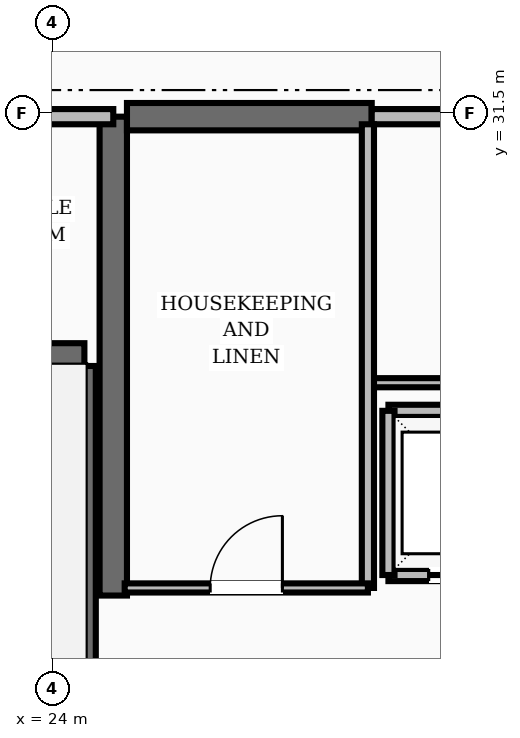
"""IFC4 building model, lengths in metres.
Left out: names, types, materials, properties, quantities, classifications, styles, units other than length and angle.
Written with IfcOpenShell. Run it as: python <this file> out.ifc"""

import sys

from ifc_helpers import new_model, si_unit, direction, frame, frame_2d, origin, place, context, subcontext, project, spatial, rectangle, extrude, element, fill, save


model = new_model("IFC4")
c1 = context("Model", 3, precision=1e-05, world=origin(), true_north=direction((0.0, 1.0)))
c2 = subcontext(c1, "Body", "Model", "MODEL_VIEW")
j1 = project(units=[si_unit("LENGTHUNIT", "METRE"), si_unit("PLANEANGLEUNIT", "RADIAN")], contexts=[c1])
p1 = place(None, origin())
s1 = spatial("IfcSite", under=j1, at=p1, CompositionType="ELEMENT")
p2 = place(p1, origin())
s2 = spatial("IfcBuilding", under=s1, at=p2, CompositionType="ELEMENT")
p3 = place(p2, frame((0.0, 0.0, 135.2)))
s3 = spatial("IfcBuildingStorey", under=s2, at=p3, CompositionType="ELEMENT", Elevation=135.2)
p4 = place(p3, frame((24.8, 25.15, 0.0), z_axis=(0.0, 0.0, 1.0), x_axis=(0.0, 1.0, 0.0)))
e1 = element("IfcWall", 1, at=p4, inside=s3, PredefinedType="SHEAR", context=c2, shape_type="SweptSolid", body=[
    extrude(rectangle(XDim=6.3, YDim=0.36, at=frame_2d((3.15, 0.0))), origin(), (0.0, 0.0, 1.0), 3.6),
])
p5 = place(p3, frame((24.98, 31.45, 0.0), z_axis=(0.0, 0.0, 1.0), x_axis=(1.0, 0.0, 0.0)))
e2 = element("IfcWall", 2, at=p5, inside=s3, PredefinedType="SHEAR", context=c2, shape_type="SweptSolid", body=[
    extrude(rectangle(XDim=3.22, YDim=0.36, at=frame_2d((1.61, 0.0))), origin(), (0.0, 0.0, 1.0), 3.6),
])
p6 = place(p3, frame((24.42, 19.43, 0.0), z_axis=(0.0, 0.0, 1.0), x_axis=(0.0, 1.0, 0.0)))
e3 = element("IfcWall", 3, at=p6, inside=s3, PredefinedType="SHEAR", context=c2, shape_type="SweptSolid", body=[
    extrude(rectangle(XDim=8.74, YDim=0.3, at=frame_2d((4.37, 0.0))), origin(), (0.0, 0.0, 1.0), 3.6),
])
p7 = place(p3, frame((20.82, 28.32, 0.0), z_axis=(0.0, 0.0, 1.0), x_axis=(1.0, 0.0, 0.0)))
e4 = element("IfcWall", 4, at=p7, inside=s3, PredefinedType="SHEAR", context=c2, shape_type="SweptSolid", body=[
    extrude(rectangle(XDim=3.6, YDim=0.3, at=frame_2d((1.8, 0.0))), origin(), (0.0, 0.0, 1.0), 3.6),
])
p8 = place(p3, frame((20.82, 31.45, 0.0), z_axis=(0.0, 0.0, 1.0), x_axis=(1.0, 0.0, 0.0)))
e5 = element("IfcWall", 5, at=p8, inside=s3, PredefinedType="SOLIDWALL", context=c2, shape_type="SweptSolid", body=[
    extrude(rectangle(XDim=3.98, YDim=0.2, at=frame_2d((1.99, 0.0))), origin(), (0.0, 0.0, 1.0), 2.8),
])
p9 = place(p3, frame((28.42, 25.42, 0.0), z_axis=(0.0, 0.0, 1.0), x_axis=(1.0, 0.0, 0.0)))
e6 = element("IfcWall", 6, at=p9, inside=s3, PredefinedType="SOLIDWALL", context=c2, shape_type="SweptSolid", body=[
    extrude(rectangle(XDim=4.66, YDim=0.16, at=frame_2d((2.33, 0.0))), origin(), (0.0, 0.0, 1.0), 2.8),
])
p10 = place(p9, frame((0.53, 0.0, 0.0)))
e7 = element("IfcOpeningElement", 7, at=p10, cuts=e6, PredefinedType="OPENING", context=c2, shape_type="SweptSolid", body=[
    extrude(rectangle(XDim=1.1, YDim=2.15, at=frame_2d((0.55, 1.075))), frame((0.0, 0.09, 0.0), z_axis=(0.0, -1.0, 0.0), x_axis=(1.0, 0.0, 0.0)), (0.0, 0.0, 1.0), 0.18),
])
p11 = place(p9, frame((3.03, 0.0, 0.0)))
e8 = element("IfcOpeningElement", 8, at=p11, cuts=e6, PredefinedType="OPENING", context=c2, shape_type="SweptSolid", body=[
    extrude(rectangle(XDim=1.1, YDim=2.15, at=frame_2d((0.55, 1.075))), frame((0.0, 0.09, 0.0), z_axis=(0.0, -1.0, 0.0), x_axis=(1.0, 0.0, 0.0)), (0.0, 0.0, 1.0), 0.18),
])
p12 = place(p3, frame((28.42, 27.58, 0.0), z_axis=(0.0, 0.0, 1.0), x_axis=(1.0, 0.0, 0.0)))
e9 = element("IfcWall", 9, at=p12, inside=s3, PredefinedType="SOLIDWALL", context=c2, shape_type="SweptSolid", body=[
    extrude(rectangle(XDim=4.66, YDim=0.16, at=frame_2d((2.33, 0.0))), origin(), (0.0, 0.0, 1.0), 2.8),
])
p13 = place(p3, frame((28.42, 25.42, 0.0), z_axis=(0.0, 0.0, 1.0), x_axis=(0.0, 1.0, 0.0)))
e10 = element("IfcWall", 10, at=p13, inside=s3, PredefinedType="SOLIDWALL", context=c2, shape_type="SweptSolid", body=[
    extrude(rectangle(XDim=2.16, YDim=0.16, at=frame_2d((1.08, 0.0))), origin(), (0.0, 0.0, 1.0), 2.8),
])
p14 = place(p3, frame((28.2, 31.45, 0.0), z_axis=(0.0, 0.0, 1.0), x_axis=(1.0, 0.0, 0.0)))
e11 = element("IfcWall", 11, at=p14, inside=s3, PredefinedType="SOLIDWALL", context=c2, shape_type="SweptSolid", body=[
    extrude(rectangle(XDim=7.6, YDim=0.2, at=frame_2d((3.8, 0.0))), origin(), (0.0, 0.0, 1.0), 2.8),
])
p15 = place(p3, frame((28.2, 27.95, 0.0), z_axis=(0.0, 0.0, 1.0), x_axis=(1.0, 0.0, 0.0)))
e12 = element("IfcWall", 12, at=p15, inside=s3, PredefinedType="PARTITIONING", context=c2, shape_type="SweptSolid", body=[
    extrude(rectangle(XDim=7.6, YDim=0.12, at=frame_2d((3.8, 0.0))), origin(), (0.0, 0.0, 1.0), 2.8),
])
p16 = place(p3, frame((28.15, 25.25, 0.0), z_axis=(0.0, 0.0, 1.0), x_axis=(0.0, 1.0, 0.0)))
e13 = element("IfcWall", 13, at=p16, inside=s3, PredefinedType="SOLIDWALL", context=c2, shape_type="SweptSolid", body=[
    extrude(rectangle(XDim=6.1, YDim=0.16, at=frame_2d((3.05, 0.0))), origin(), (0.0, 0.0, 1.0), 2.8),
])
p17 = place(p3, frame((24.95, 25.25, 0.0), z_axis=(0.0, 0.0, 1.0), x_axis=(1.0, 0.0, 0.0)))
e14 = element("IfcWall", 14, at=p17, inside=s3, PredefinedType="PARTITIONING", context=c2, shape_type="SweptSolid", body=[
    extrude(rectangle(XDim=3.2, YDim=0.12, at=frame_2d((1.6, 0.0))), origin(), (0.0, 0.0, 1.0), 2.8),
])
p18 = place(p17, frame((1.125, 0.0, 0.0)))
e15 = element("IfcOpeningElement", 15, at=p18, cuts=e14, PredefinedType="OPENING", context=c2, shape_type="SweptSolid", body=[
    extrude(rectangle(XDim=0.95, YDim=2.1, at=frame_2d((0.475, 1.05))), frame((0.0, 0.07, 0.0), z_axis=(0.0, -1.0, 0.0), x_axis=(1.0, 0.0, 0.0)), (0.0, 0.0, 1.0), 0.14),
])
p19 = place(p10, origin())
e16 = element("IfcDoor", 16, at=p19, inside=s3, OperationType="SLIDING_TO_RIGHT", PredefinedType="DOOR", context=c2, shape_type="SweptSolid", body=[
    extrude(rectangle(XDim=1.1, YDim=2.15, at=frame_2d((0.55, 1.075))), frame((0.0, 0.025, 0.0), z_axis=(0.0, -1.0, 0.0), x_axis=(1.0, 0.0, 0.0)), (0.0, 0.0, 1.0), 0.05),
])
fill(e7, e16)
p20 = place(p18, origin())
e17 = element("IfcDoor", 17, at=p20, inside=s3, OperationType="SINGLE_SWING_RIGHT", PredefinedType="DOOR", context=c2, shape_type="SweptSolid", body=[
    extrude(rectangle(XDim=0.95, YDim=2.1, at=frame_2d((0.475, 1.05))), frame((0.0, 0.025, 0.0), z_axis=(0.0, -1.0, 0.0), x_axis=(1.0, 0.0, 0.0)), (0.0, 0.0, 1.0), 0.05),
])
fill(e15, e17)
save(model, sys.argv[1])
